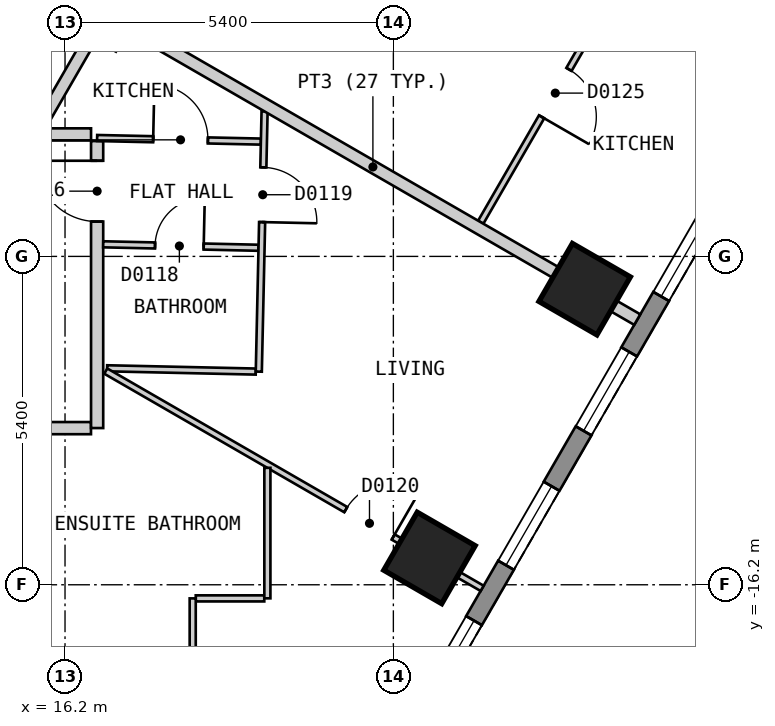
"""IFC4 building model, lengths in metres.
Left out: names, types, materials, properties, quantities, classifications, styles, units other than length and angle.
Written with IfcOpenShell. Run it as: python <this file> out.ifc"""

import sys

from ifc_helpers import new_model, si_unit, direction, frame, frame_2d, origin, origin_2d, place, context, subcontext, project, spatial, polyline, rectangle, outline, extrude, element, fill, save


model = new_model("IFC4")
c1 = context("Model", 3, precision=1e-05, world=origin(), true_north=direction((0.0, 1.0)))
c2 = subcontext(c1, "Body", "Model", "MODEL_VIEW")
j1 = project(units=[si_unit("LENGTHUNIT", "METRE"), si_unit("PLANEANGLEUNIT", "RADIAN")], contexts=[c1])
p1 = place(None, origin())
s1 = spatial("IfcSite", under=j1, at=p1, CompositionType="ELEMENT")
p2 = place(p1, origin())
s2 = spatial("IfcBuilding", under=s1, at=p2, CompositionType="ELEMENT")
p3 = place(p2, frame((0.0, 0.0, 23.4)))
s3 = spatial("IfcBuildingStorey", under=s2, at=p3, CompositionType="ELEMENT", Elevation=23.4)
for number, where, z_axis, x_axis in (
    (1, (22.194, -15.759, 0.0), (0.0, 0.0, 1.0), (0.5, 0.866, 0.0)),
    (2, (24.746, -11.339, 0.0), (0.0, 0.0, 1.0), (0.5, 0.866, 0.0)),
    (3, (27.298, -6.919, 0.0), (0.0, 0.0, 1.0), (0.5, 0.866, 0.0)),
):
    element("IfcColumn", number, at=place(p3, frame(where, z_axis=z_axis, x_axis=x_axis)), inside=s3, PredefinedType="COLUMN", context=c2, shape_type="SweptSolid", body=[
        extrude(rectangle(XDim=1.1, YDim=1.1, at=origin_2d()), origin(), (0.0, 0.0, 1.0), 3.0),
    ])
p4 = place(p3, frame((17.71, -25.825, 0.0), z_axis=(0.0, 0.0, 1.0), x_axis=(0.500001938803, 0.866024284413, 0.0)))
e4 = element("IfcWall", 4, at=p4, inside=s3, PredefinedType="SOLIDWALL", context=c2, shape_type="SweptSolid", body=[
    extrude(outline(polyline([(0.0, -0.15), (27.02, -0.15), (26.94, 0.15), (0.08, 0.15), (0.0, -0.15)])), origin(), (0.0, 0.0, 1.0), 2.7),
])
p5 = place(p4, frame((1.277, 0.0, 0.15)))
e5 = element("IfcOpeningElement", 5, at=p5, cuts=e4, PredefinedType="OPENING", context=c2, shape_type="SweptSolid", body=[
    extrude(rectangle(XDim=1.5, YDim=2.1, at=frame_2d((0.75, 1.05))), frame((0.0, 0.16, 0.0), z_axis=(0.0, -1.0, 0.0), x_axis=(1.0, 0.0, 0.0)), (0.0, 0.0, 1.0), 0.32),
])
p6 = place(p4, frame((3.829, 0.0, 0.15)))
e6 = element("IfcOpeningElement", 6, at=p6, cuts=e4, PredefinedType="OPENING", context=c2, shape_type="SweptSolid", body=[
    extrude(rectangle(XDim=1.5, YDim=2.1, at=frame_2d((0.75, 1.05))), frame((0.0, 0.16, 0.0), z_axis=(0.0, -1.0, 0.0), x_axis=(1.0, 0.0, 0.0)), (0.0, 0.0, 1.0), 0.32),
])
p7 = place(p4, frame((6.382, 0.0, 0.15)))
e7 = element("IfcOpeningElement", 7, at=p7, cuts=e4, PredefinedType="OPENING", context=c2, shape_type="SweptSolid", body=[
    extrude(rectangle(XDim=1.5, YDim=2.1, at=frame_2d((0.75, 1.05))), frame((0.0, 0.16, 0.0), z_axis=(0.0, -1.0, 0.0), x_axis=(1.0, 0.0, 0.0)), (0.0, 0.0, 1.0), 0.32),
])
p8 = place(p4, frame((8.933, 0.0, 0.15)))
e8 = element("IfcOpeningElement", 8, at=p8, cuts=e4, PredefinedType="OPENING", context=c2, shape_type="SweptSolid", body=[
    extrude(rectangle(XDim=1.5, YDim=2.1, at=frame_2d((0.75, 1.05))), frame((0.0, 0.16, 0.0), z_axis=(0.0, -1.0, 0.0), x_axis=(1.0, 0.0, 0.0)), (0.0, 0.0, 1.0), 0.32),
])
p9 = place(p4, frame((11.485, 0.0, 0.15)))
e9 = element("IfcOpeningElement", 9, at=p9, cuts=e4, PredefinedType="OPENING", context=c2, shape_type="SweptSolid", body=[
    extrude(rectangle(XDim=1.5, YDim=2.1, at=frame_2d((0.75, 1.05))), frame((0.0, 0.16, 0.0), z_axis=(0.0, -1.0, 0.0), x_axis=(1.0, 0.0, 0.0)), (0.0, 0.0, 1.0), 0.32),
])
p10 = place(p4, frame((14.037, 0.0, 0.15)))
e10 = element("IfcOpeningElement", 10, at=p10, cuts=e4, PredefinedType="OPENING", context=c2, shape_type="SweptSolid", body=[
    extrude(rectangle(XDim=1.5, YDim=2.1, at=frame_2d((0.75, 1.05))), frame((0.0, 0.16, 0.0), z_axis=(0.0, -1.0, 0.0), x_axis=(1.0, 0.0, 0.0)), (0.0, 0.0, 1.0), 0.32),
])
p11 = place(p4, frame((16.589, 0.0, 0.15)))
e11 = element("IfcOpeningElement", 11, at=p11, cuts=e4, PredefinedType="OPENING", context=c2, shape_type="SweptSolid", body=[
    extrude(rectangle(XDim=1.5, YDim=2.1, at=frame_2d((0.75, 1.05))), frame((0.0, 0.16, 0.0), z_axis=(0.0, -1.0, 0.0), x_axis=(1.0, 0.0, 0.0)), (0.0, 0.0, 1.0), 0.32),
])
p12 = place(p4, frame((19.141, 0.0, 0.15)))
e12 = element("IfcOpeningElement", 12, at=p12, cuts=e4, PredefinedType="OPENING", context=c2, shape_type="SweptSolid", body=[
    extrude(rectangle(XDim=1.5, YDim=2.1, at=frame_2d((0.75, 1.05))), frame((0.0, 0.16, 0.0), z_axis=(0.0, -1.0, 0.0), x_axis=(1.0, 0.0, 0.0)), (0.0, 0.0, 1.0), 0.32),
])
p13 = place(p4, frame((21.693, 0.0, 0.15)))
e13 = element("IfcOpeningElement", 13, at=p13, cuts=e4, PredefinedType="OPENING", context=c2, shape_type="SweptSolid", body=[
    extrude(rectangle(XDim=1.5, YDim=2.1, at=frame_2d((0.75, 1.05))), frame((0.0, 0.16, 0.0), z_axis=(0.0, -1.0, 0.0), x_axis=(1.0, 0.0, 0.0)), (0.0, 0.0, 1.0), 0.32),
])
p14 = place(p4, frame((24.244, 0.0, 0.15)))
e14 = element("IfcOpeningElement", 14, at=p14, cuts=e4, PredefinedType="OPENING", context=c2, shape_type="SweptSolid", body=[
    extrude(rectangle(XDim=1.5, YDim=2.1, at=frame_2d((0.75, 1.05))), frame((0.0, 0.16, 0.0), z_axis=(0.0, -1.0, 0.0), x_axis=(1.0, 0.0, 0.0)), (0.0, 0.0, 1.0), 0.32),
])
p15 = place(p3, frame((15.822, -8.794, 0.0), z_axis=(0.0, 0.0, 1.0), x_axis=(1.0, 0.0, 0.0)))
e15 = element("IfcWall", 15, at=p15, inside=s3, PredefinedType="PARTITIONING", context=c2, shape_type="SweptSolid", body=[
    extrude(rectangle(XDim=0.806, YDim=0.2, at=frame_2d((0.403, 0.0))), origin(), (0.0, 0.0, 1.0), 2.7),
])
p16 = place(p3, frame((15.6, -13.624, 0.0), z_axis=(0.0, 0.0, 1.0), x_axis=(1.0, 0.0, 0.0)))
e16 = element("IfcWall", 16, at=p16, inside=s3, PredefinedType="PARTITIONING", context=c2, shape_type="SweptSolid", body=[
    extrude(rectangle(XDim=1.027, YDim=0.2, at=frame_2d((0.513, 0.0))), origin(), (0.0, 0.0, 1.0), 2.7),
])
p17 = place(p3, frame((15.707, -8.794, 0.0), z_axis=(0.0, 0.0, 1.0), x_axis=(0.500040469623, 0.866002037376, 0.0)))
e17 = element("IfcWall", 17, at=p17, inside=s3, PredefinedType="PARTITIONING", context=c2, shape_type="SweptSolid", body=[
    extrude(rectangle(XDim=2.281, YDim=0.2, at=frame_2d((1.141, 0.0))), origin(), (0.0, 0.0, 1.0), 2.7),
])
p18 = place(p3, frame((16.728, -13.623, 0.0), z_axis=(0.0, 0.0, 1.0), x_axis=(0.0, 1.0, 0.0)))
e18 = element("IfcWall", 18, at=p18, inside=s3, PredefinedType="PARTITIONING", context=c2, shape_type="SweptSolid", body=[
    extrude(rectangle(XDim=4.72, YDim=0.2, at=frame_2d((2.36, 0.0))), origin(), (0.0, 0.0, 1.0), 2.7),
])
p19 = place(p18, frame((3.396, 0.0, 0.0)))
e19 = element("IfcOpeningElement", 19, at=p19, cuts=e18, PredefinedType="OPENING", context=c2, shape_type="SweptSolid", body=[
    extrude(rectangle(XDim=1.0, YDim=2.1, at=frame_2d((0.5, 1.05))), frame((0.0, 0.11, 0.0), z_axis=(0.0, -1.0, 0.0), x_axis=(1.0, 0.0, 0.0)), (0.0, 0.0, 1.0), 0.22),
])
p20 = place(p3, frame((16.728, -8.853, 0.0), z_axis=(0.0, 0.0, 1.0), x_axis=(0.999759401479, -0.02193488442, 0.0)))
e20 = element("IfcWall", 20, at=p20, inside=s3, PredefinedType="PARTITIONING", context=c2, shape_type="SweptSolid", body=[
    extrude(rectangle(XDim=2.694, YDim=0.1, at=frame_2d((1.347, 0.0))), origin(), (0.0, 0.0, 1.0), 2.7),
])
p21 = place(p20, frame((0.922, 0.0, 0.0)))
e21 = element("IfcOpeningElement", 21, at=p21, cuts=e20, PredefinedType="OPENING", context=c2, shape_type="SweptSolid", body=[
    extrude(rectangle(XDim=0.9, YDim=2.1, at=frame_2d((0.45, 1.05))), frame((0.0, 0.06, 0.0), z_axis=(0.0, -1.0, 0.0), x_axis=(1.0, 0.0, 0.0)), (0.0, 0.0, 1.0), 0.12),
])
p22 = place(p3, frame((16.828, -10.601, 0.0), z_axis=(0.0, 0.0, 1.0), x_axis=(0.999752091799, -0.022265555094, 0.0)))
e22 = element("IfcWall", 22, at=p22, inside=s3, PredefinedType="PARTITIONING", context=c2, shape_type="SweptSolid", body=[
    extrude(rectangle(XDim=2.555, YDim=0.1, at=frame_2d((1.277, 0.0))), origin(), (0.0, 0.0, 1.0), 2.7),
])
p23 = place(p22, frame((0.853, 0.0, 0.0)))
e23 = element("IfcOpeningElement", 23, at=p23, cuts=e22, PredefinedType="OPENING", context=c2, shape_type="SweptSolid", body=[
    extrude(rectangle(XDim=0.8, YDim=2.1, at=frame_2d((0.4, 1.05))), frame((0.0, 0.06, 0.0), z_axis=(0.0, -1.0, 0.0), x_axis=(1.0, 0.0, 0.0)), (0.0, 0.0, 1.0), 0.12),
])
p24 = place(p3, frame((16.892, -12.64, 0.0), z_axis=(0.0, 0.0, 1.0), x_axis=(0.999754359069, -0.022163517846, 0.0)))
e24 = element("IfcWall", 24, at=p24, inside=s3, PredefinedType="PARTITIONING", context=c2, shape_type="SweptSolid", body=[
    extrude(rectangle(XDim=2.445, YDim=0.1, at=frame_2d((1.223, 0.0))), origin(), (0.0, 0.0, 1.0), 2.7),
])
p25 = place(p3, frame((16.87, -12.686, 0.0), z_axis=(0.0, 0.0, 1.0), x_axis=(0.866071826058, -0.499919585642, 0.0)))
e25 = element("IfcWall", 25, at=p25, inside=s3, PredefinedType="PARTITIONING", context=c2, shape_type="SweptSolid", body=[
    extrude(rectangle(XDim=7.147, YDim=0.1, at=frame_2d((3.574, 0.0))), origin(), (0.0, 0.0, 1.0), 2.7),
])
p26 = place(p25, frame((4.558, 0.0, 0.0)))
e26 = element("IfcOpeningElement", 26, at=p26, cuts=e25, PredefinedType="OPENING", context=c2, shape_type="SweptSolid", body=[
    extrude(rectangle(XDim=0.9, YDim=2.1, at=frame_2d((0.45, 1.05))), frame((0.0, 0.06, 0.0), z_axis=(0.0, -1.0, 0.0), x_axis=(1.0, 0.0, 0.0)), (0.0, 0.0, 1.0), 0.12),
])
p27 = place(p3, frame((19.503, -2.419, 0.0), z_axis=(0.0, 0.0, 1.0), x_axis=(0.866047370643, -0.499961950354, 0.0)))
e27 = element("IfcWall", 27, at=p27, inside=s3, PredefinedType="PARTITIONING", context=c2, shape_type="SweptSolid", body=[
    extrude(rectangle(XDim=10.001, YDim=0.1, at=frame_2d((5.0, 0.0))), origin(), (0.0, 0.0, 1.0), 2.7),
])
p28 = place(p27, frame((4.912, 0.0, 0.0)))
e28 = element("IfcOpeningElement", 28, at=p28, cuts=e27, PredefinedType="OPENING", context=c2, shape_type="SweptSolid", body=[
    extrude(rectangle(XDim=0.9, YDim=2.1, at=frame_2d((0.45, 1.05))), frame((0.0, 0.06, 0.0), z_axis=(0.0, -1.0, 0.0), x_axis=(1.0, 0.0, 0.0)), (0.0, 0.0, 1.0), 0.12),
])
p29 = place(p3, frame((18.35, -16.424, 0.0), z_axis=(0.0, 0.0, 1.0), x_axis=(1.0, 0.0, 0.0)))
e29 = element("IfcWall", 29, at=p29, inside=s3, PredefinedType="PARTITIONING", context=c2, shape_type="SweptSolid", body=[
    extrude(rectangle(XDim=1.127, YDim=0.1, at=frame_2d((0.563, 0.0))), origin(), (0.0, 0.0, 1.0), 2.7),
])
p30 = place(p3, frame((23.037, -10.238, 0.0), z_axis=(0.0, 0.0, 1.0), x_axis=(0.49999264683, 0.866029649098, 0.0)))
e30 = element("IfcWall", 30, at=p30, inside=s3, PredefinedType="PARTITIONING", context=c2, shape_type="SweptSolid", body=[
    extrude(rectangle(XDim=4.954, YDim=0.1, at=frame_2d((2.477, 0.0))), origin(), (0.0, 0.0, 1.0), 2.7),
])
p31 = place(p30, frame((2.002, 0.0, 0.0)))
e31 = element("IfcOpeningElement", 31, at=p31, cuts=e30, PredefinedType="OPENING", context=c2, shape_type="SweptSolid", body=[
    extrude(rectangle(XDim=0.9, YDim=2.1, at=frame_2d((0.45, 1.05))), frame((0.0, 0.06, 0.0), z_axis=(0.0, -1.0, 0.0), x_axis=(1.0, 0.0, 0.0)), (0.0, 0.0, 1.0), 0.12),
])
p32 = place(p3, frame((19.387, -12.695, 0.0), z_axis=(0.0, 0.0, 1.0), x_axis=(0.022188864436, 0.99975379684, 0.0)))
e32 = element("IfcWall", 32, at=p32, inside=s3, PredefinedType="PARTITIONING", context=c2, shape_type="SweptSolid", body=[
    extrude(rectangle(XDim=4.28, YDim=0.1, at=frame_2d((2.14, 0.0))), origin(), (0.0, 0.0, 1.0), 2.7),
])
p33 = place(p32, frame((2.46, 0.0, 0.0)))
e33 = element("IfcOpeningElement", 33, at=p33, cuts=e32, PredefinedType="OPENING", context=c2, shape_type="SweptSolid", body=[
    extrude(rectangle(XDim=0.9, YDim=2.1, at=frame_2d((0.45, 1.05))), frame((0.0, 0.06, 0.0), z_axis=(0.0, -1.0, 0.0), x_axis=(1.0, 0.0, 0.0)), (0.0, 0.0, 1.0), 0.12),
])
p34 = place(p3, frame((18.3, -19.289, 0.0), z_axis=(0.0, 0.0, 1.0), x_axis=(0.0, 1.0, 0.0)))
e34 = element("IfcWall", 34, at=p34, inside=s3, PredefinedType="PARTITIONING", context=c2, shape_type="SweptSolid", body=[
    extrude(rectangle(XDim=2.865, YDim=0.1, at=frame_2d((1.433, 0.0))), origin(), (0.0, 0.0, 1.0), 2.7),
])
p35 = place(p34, frame((0.975, 0.0, 0.0)))
e35 = element("IfcOpeningElement", 35, at=p35, cuts=e34, PredefinedType="OPENING", context=c2, shape_type="SweptSolid", body=[
    extrude(rectangle(XDim=0.8, YDim=2.1, at=frame_2d((0.4, 1.05))), frame((0.0, 0.06, 0.0), z_axis=(0.0, -1.0, 0.0), x_axis=(1.0, 0.0, 0.0)), (0.0, 0.0, 1.0), 0.12),
])
p36 = place(p3, frame((19.528, -16.423, 0.0), z_axis=(0.0, 0.0, 1.0), x_axis=(0.0, 1.0, 0.0)))
e36 = element("IfcWall", 36, at=p36, inside=s3, PredefinedType="PARTITIONING", context=c2, shape_type="SweptSolid", body=[
    extrude(rectangle(XDim=2.146, YDim=0.1, at=frame_2d((1.073, 0.0))), origin(), (0.0, 0.0, 1.0), 2.7),
])
p37 = place(p3, frame((16.916, -6.819, 0.0), z_axis=(0.0, 0.0, 1.0), x_axis=(0.866028876723, -0.499993984646, 0.0)))
e37 = element("IfcWall", 37, at=p37, inside=s3, PredefinedType="PARTITIONING", context=c2, shape_type="SweptSolid", body=[
    extrude(rectangle(XDim=10.04, YDim=0.2, at=frame_2d((5.02, 0.0))), origin(), (0.0, 0.0, 1.0), 2.7),
])
p38 = place(p8, origin())
e38 = element("IfcWindow", 38, at=p38, inside=s3, PartitioningType="SINGLE_PANEL", PredefinedType="WINDOW", context=c2, shape_type="SweptSolid", body=[
    extrude(rectangle(XDim=1.5, YDim=2.1, at=frame_2d((0.75, 1.05))), frame((0.0, 0.03, 0.0), z_axis=(0.0, -1.0, 0.0), x_axis=(1.0, 0.0, 0.0)), (0.0, 0.0, 1.0), 0.06),
])
fill(e8, e38)
p39 = place(p9, origin())
e39 = element("IfcWindow", 39, at=p39, inside=s3, PartitioningType="SINGLE_PANEL", PredefinedType="WINDOW", context=c2, shape_type="SweptSolid", body=[
    extrude(rectangle(XDim=1.5, YDim=2.1, at=frame_2d((0.75, 1.05))), frame((0.0, 0.03, 0.0), z_axis=(0.0, -1.0, 0.0), x_axis=(1.0, 0.0, 0.0)), (0.0, 0.0, 1.0), 0.06),
])
fill(e9, e39)
p40 = place(p10, origin())
e40 = element("IfcWindow", 40, at=p40, inside=s3, PartitioningType="SINGLE_PANEL", PredefinedType="WINDOW", context=c2, shape_type="SweptSolid", body=[
    extrude(rectangle(XDim=1.5, YDim=2.1, at=frame_2d((0.75, 1.05))), frame((0.0, 0.03, 0.0), z_axis=(0.0, -1.0, 0.0), x_axis=(1.0, 0.0, 0.0)), (0.0, 0.0, 1.0), 0.06),
])
fill(e10, e40)
p41 = place(p11, origin())
e41 = element("IfcWindow", 41, at=p41, inside=s3, PartitioningType="SINGLE_PANEL", PredefinedType="WINDOW", context=c2, shape_type="SweptSolid", body=[
    extrude(rectangle(XDim=1.5, YDim=2.1, at=frame_2d((0.75, 1.05))), frame((0.0, 0.03, 0.0), z_axis=(0.0, -1.0, 0.0), x_axis=(1.0, 0.0, 0.0)), (0.0, 0.0, 1.0), 0.06),
])
fill(e11, e41)
p42 = place(p19, origin())
e42 = element("IfcDoor", 42, at=p42, inside=s3, OperationType="SINGLE_SWING_RIGHT", PredefinedType="DOOR", context=c2, shape_type="SweptSolid", body=[
    extrude(rectangle(XDim=1.0, YDim=2.1, at=frame_2d((0.5, 1.05))), frame((0.0, 0.025, 0.0), z_axis=(0.0, -1.0, 0.0), x_axis=(1.0, 0.0, 0.0)), (0.0, 0.0, 1.0), 0.05),
])
fill(e19, e42)
p43 = place(p21, origin())
e43 = element("IfcDoor", 43, at=p43, inside=s3, OperationType="SINGLE_SWING_LEFT", PredefinedType="DOOR", context=c2, shape_type="SweptSolid", body=[
    extrude(rectangle(XDim=0.9, YDim=2.1, at=frame_2d((0.45, 1.05))), frame((0.0, 0.025, 0.0), z_axis=(0.0, -1.0, 0.0), x_axis=(1.0, 0.0, 0.0)), (0.0, 0.0, 1.0), 0.05),
])
fill(e21, e43)
p44 = place(p23, origin())
e44 = element("IfcDoor", 44, at=p44, inside=s3, OperationType="SINGLE_SWING_RIGHT", PredefinedType="DOOR", context=c2, shape_type="SweptSolid", body=[
    extrude(rectangle(XDim=0.8, YDim=2.1, at=frame_2d((0.4, 1.05))), frame((0.0, 0.025, 0.0), z_axis=(0.0, -1.0, 0.0), x_axis=(1.0, 0.0, 0.0)), (0.0, 0.0, 1.0), 0.05),
])
fill(e23, e44)
p45 = place(p33, origin())
e45 = element("IfcDoor", 45, at=p45, inside=s3, OperationType="SINGLE_SWING_LEFT", PredefinedType="DOOR", context=c2, shape_type="SweptSolid", body=[
    extrude(rectangle(XDim=0.9, YDim=2.1, at=frame_2d((0.45, 1.05))), frame((0.0, 0.025, 0.0), z_axis=(0.0, -1.0, 0.0), x_axis=(1.0, 0.0, 0.0)), (0.0, 0.0, 1.0), 0.05),
])
fill(e33, e45)
p46 = place(p26, origin())
e46 = element("IfcDoor", 46, at=p46, inside=s3, OperationType="SINGLE_SWING_RIGHT", PredefinedType="DOOR", context=c2, shape_type="SweptSolid", body=[
    extrude(rectangle(XDim=0.9, YDim=2.1, at=frame_2d((0.45, 1.05))), frame((0.0, 0.025, 0.0), z_axis=(0.0, -1.0, 0.0), x_axis=(1.0, 0.0, 0.0)), (0.0, 0.0, 1.0), 0.05),
])
fill(e26, e46)
p47 = place(p31, origin())
e47 = element("IfcDoor", 47, at=p47, inside=s3, OperationType="SINGLE_SWING_LEFT", PredefinedType="DOOR", context=c2, shape_type="SweptSolid", body=[
    extrude(rectangle(XDim=0.9, YDim=2.1, at=frame_2d((0.45, 1.05))), frame((0.0, 0.025, 0.0), z_axis=(0.0, -1.0, 0.0), x_axis=(1.0, 0.0, 0.0)), (0.0, 0.0, 1.0), 0.05),
])
fill(e31, e47)
save(model, sys.argv[1])
